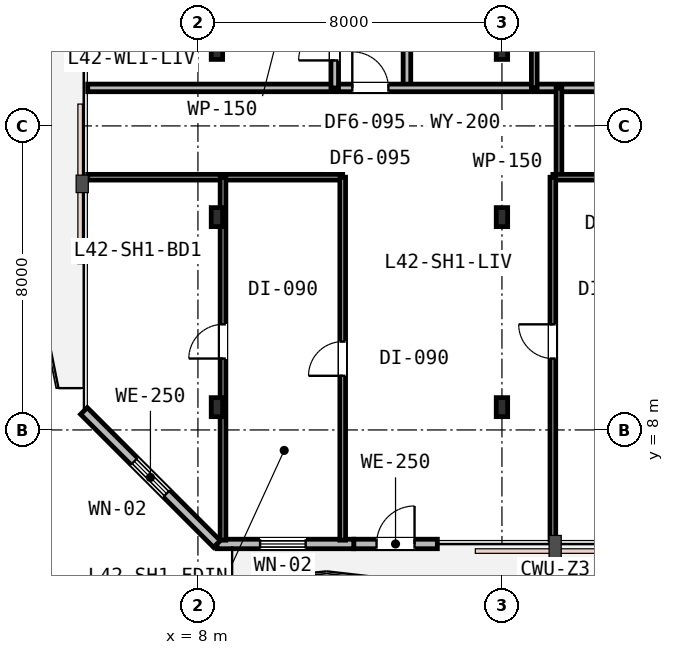
"""IFC4 building model, lengths in metres.
Left out: names, types, materials, properties, quantities, classifications, styles, units other than length and angle.
Written with IfcOpenShell. Run it as: python <this file> out.ifc"""

import sys

from ifc_helpers import new_model, si_unit, direction, frame, frame_2d, origin, origin_2d, place, context, subcontext, project, spatial, rectangle, i_section, extrude, element, fill, save


model = new_model("IFC4")
c1 = context("Model", 3, precision=1e-05, world=origin(), true_north=direction((0.0, 1.0)))
c2 = subcontext(c1, "Body", "Model", "MODEL_VIEW")
j1 = project(units=[si_unit("LENGTHUNIT", "METRE"), si_unit("PLANEANGLEUNIT", "RADIAN")], contexts=[c1])
p1 = place(None, origin())
s1 = spatial("IfcSite", under=j1, at=p1, CompositionType="ELEMENT")
p2 = place(p1, origin())
s2 = spatial("IfcBuilding", under=s1, at=p2, CompositionType="ELEMENT")
p3 = place(p2, frame((0.0, 0.0, 165.0)))
s3 = spatial("IfcBuildingStorey", under=s2, at=p3, CompositionType="ELEMENT", Elevation=165.0)
for number, where, z_axis, x_axis in (
    (1, (8.5, 8.6, 0.0), (0.0, 0.0, 1.0), (1.0, 0.0, 0.0)),
    (2, (16.0, 8.6, 0.0), (0.0, 0.0, 1.0), (1.0, 0.0, 0.0)),
    (3, (8.5, 13.6, 0.0), (0.0, 0.0, 1.0), (1.0, 0.0, 0.0)),
    (4, (16.0, 13.6, 0.0), (0.0, 0.0, 1.0), (1.0, 0.0, 0.0)),
    (5, (8.5, 18.0, 0.0), (0.0, 0.0, 1.0), (1.0, 0.0, 0.0)),
    (6, (16.0, 18.0, 0.0), (0.0, 0.0, 1.0), (1.0, 0.0, 0.0)),
):
    element("IfcColumn", number, at=place(p3, frame(where, z_axis=z_axis, x_axis=x_axis)), inside=s3, PredefinedType="COLUMN", context=c2, shape_type="SweptSolid", body=[
        extrude(i_section(OverallWidth=0.3, OverallDepth=0.5, WebThickness=0.015, FlangeThickness=0.028, FilletRadius=0.027, at=origin_2d()), origin(), (0.0, 0.0, 1.0), 3.6),
    ])
p4 = place(p3, frame((12.1, 5.0, 0.0), z_axis=(0.0, 0.0, 1.0), x_axis=(1.0, 0.0, 0.0)))
e7 = element("IfcWall", 7, at=p4, inside=s3, PredefinedType="STANDARD", context=c2, shape_type="SweptSolid", body=[
    extrude(rectangle(XDim=2.2, YDim=0.25, at=frame_2d((1.1, 0.0))), origin(), (0.0, 0.0, 1.0), 3.33),
])
p5 = place(p4, frame((0.6, 0.0, 0.0)))
e8 = element("IfcOpeningElement", 8, at=p5, cuts=e7, PredefinedType="OPENING", context=c2, shape_type="SweptSolid", body=[
    extrude(rectangle(XDim=1.0, YDim=2.15, at=frame_2d((0.5, 1.075))), frame((0.0, 0.135, 0.0), z_axis=(0.0, -1.0, 0.0), x_axis=(1.0, 0.0, 0.0)), (0.0, 0.0, 1.0), 0.27),
])
p6 = place(p3, frame((8.5, 5.0, 0.0), z_axis=(0.0, 0.0, 1.0), x_axis=(1.0, 0.0, 0.0)))
e9 = element("IfcWall", 9, at=p6, inside=s3, PredefinedType="STANDARD", context=c2, shape_type="SweptSolid", body=[
    extrude(rectangle(XDim=3.6, YDim=0.25, at=frame_2d((1.8, 0.0))), origin(), (0.0, 0.0, 1.0), 3.33),
])
p7 = place(p6, frame((1.135, 0.0, 0.85)))
e10 = element("IfcOpeningElement", 10, at=p7, cuts=e9, PredefinedType="OPENING", context=c2, shape_type="SweptSolid", body=[
    extrude(rectangle(XDim=1.2, YDim=1.6, at=frame_2d((0.6, 0.8))), frame((0.0, 0.135, 0.0), z_axis=(0.0, -1.0, 0.0), x_axis=(1.0, 0.0, 0.0)), (0.0, 0.0, 1.0), 0.27),
])
p8 = place(p3, frame((5.0, 8.5, 0.0), z_axis=(0.0, 0.0, 1.0), x_axis=(0.707106781187, -0.707106781187, 0.0)))
e11 = element("IfcWall", 11, at=p8, inside=s3, PredefinedType="STANDARD", context=c2, shape_type="SweptSolid", body=[
    extrude(rectangle(XDim=4.95, YDim=0.25, at=frame_2d((2.475, 0.0))), origin(), (0.0, 0.0, 1.0), 3.33),
])
p9 = place(p8, frame((1.875, 0.0, 0.85)))
e12 = element("IfcOpeningElement", 12, at=p9, cuts=e11, PredefinedType="OPENING", context=c2, shape_type="SweptSolid", body=[
    extrude(rectangle(XDim=1.2, YDim=1.6, at=frame_2d((0.6, 0.8))), frame((0.0, 0.135, 0.0), z_axis=(0.0, -1.0, 0.0), x_axis=(1.0, 0.0, 0.0)), (0.0, 0.0, 1.0), 0.27),
])
p10 = place(p3, frame((13.5, 17.0, 0.0), z_axis=(0.0, 0.0, 1.0), x_axis=(0.0, 1.0, 0.0)))
e13 = element("IfcWall", 13, at=p10, inside=s3, PredefinedType="PARTITIONING", context=c2, shape_type="SweptSolid", body=[
    extrude(rectangle(XDim=18.0, YDim=0.2, at=frame_2d((9.0, 0.0))), origin(), (0.0, 0.0, 1.0), 2.93),
])
p11 = place(p10, frame((15.425, 0.0, 0.0)))
e14 = element("IfcOpeningElement", 14, at=p11, cuts=e13, PredefinedType="OPENING", context=c2, shape_type="SweptSolid", body=[
    extrude(rectangle(XDim=0.95, YDim=2.15, at=frame_2d((0.475, 1.075))), frame((0.0, 0.11, 0.0), z_axis=(0.0, -1.0, 0.0), x_axis=(1.0, 0.0, 0.0)), (0.0, 0.0, 1.0), 0.22),
])
p12 = place(p10, frame((10.225, 0.0, 0.0)))
e15 = element("IfcOpeningElement", 15, at=p12, cuts=e13, PredefinedType="OPENING", context=c2, shape_type="SweptSolid", body=[
    extrude(rectangle(XDim=0.95, YDim=2.15, at=frame_2d((0.475, 1.075))), frame((0.0, 0.11, 0.0), z_axis=(0.0, -1.0, 0.0), x_axis=(1.0, 0.0, 0.0)), (0.0, 0.0, 1.0), 0.22),
])
p13 = place(p3, frame((5.1, 17.0, 0.0), z_axis=(0.0, 0.0, 1.0), x_axis=(1.0, 0.0, 0.0)))
e16 = element("IfcWall", 16, at=p13, inside=s3, PredefinedType="PARTITIONING", context=c2, shape_type="SweptSolid", body=[
    extrude(rectangle(XDim=18.8, YDim=0.2, at=frame_2d((9.4, 0.0))), origin(), (0.0, 0.0, 1.0), 2.93),
])
p14 = place(p13, frame((6.962, 0.0, 0.0)))
e17 = element("IfcOpeningElement", 17, at=p14, cuts=e16, PredefinedType="OPENING", context=c2, shape_type="SweptSolid", body=[
    extrude(rectangle(XDim=0.95, YDim=2.15, at=frame_2d((0.475, 1.075))), frame((0.0, 0.11, 0.0), z_axis=(0.0, -1.0, 0.0), x_axis=(1.0, 0.0, 0.0)), (0.0, 0.0, 1.0), 0.22),
])
p15 = place(p3, frame((11.6, 17.0, 0.0), z_axis=(0.0, 0.0, 1.0), x_axis=(0.0, 1.0, 0.0)))
e18 = element("IfcWall", 18, at=p15, inside=s3, PredefinedType="PARTITIONING", context=c2, shape_type="SweptSolid", body=[
    extrude(rectangle(XDim=11.6, YDim=0.2, at=frame_2d((5.8, 0.0))), origin(), (0.0, 0.0, 1.0), 2.93),
])
p16 = place(p15, frame((0.723, 0.0, 0.0)))
e19 = element("IfcOpeningElement", 19, at=p16, cuts=e18, PredefinedType="OPENING", context=c2, shape_type="SweptSolid", body=[
    extrude(rectangle(XDim=0.95, YDim=2.15, at=frame_2d((0.475, 1.075))), frame((0.0, 0.11, 0.0), z_axis=(0.0, -1.0, 0.0), x_axis=(1.0, 0.0, 0.0)), (0.0, 0.0, 1.0), 0.22),
])
p17 = place(p3, frame((16.85, 17.0, 0.0), z_axis=(0.0, 0.0, 1.0), x_axis=(0.0, 1.0, 0.0)))
e20 = element("IfcWall", 20, at=p17, inside=s3, PredefinedType="PARTITIONING", context=c2, shape_type="SweptSolid", body=[
    extrude(rectangle(XDim=9.8, YDim=0.15, at=frame_2d((4.9, 0.0))), origin(), (0.0, 0.0, 1.0), 2.93),
])
p18 = place(p17, frame((5.598, 0.0, 0.0)))
e21 = element("IfcOpeningElement", 21, at=p18, cuts=e20, PredefinedType="OPENING", context=c2, shape_type="SweptSolid", body=[
    extrude(rectangle(XDim=0.85, YDim=2.15, at=frame_2d((0.425, 1.075))), frame((0.0, 0.085, 0.0), z_axis=(0.0, -1.0, 0.0), x_axis=(1.0, 0.0, 0.0)), (0.0, 0.0, 1.0), 0.17),
])
p19 = place(p17, frame((8.496, 0.0, 0.0)))
e22 = element("IfcOpeningElement", 22, at=p19, cuts=e20, PredefinedType="OPENING", context=c2, shape_type="SweptSolid", body=[
    extrude(rectangle(XDim=0.85, YDim=2.15, at=frame_2d((0.425, 1.075))), frame((0.0, 0.085, 0.0), z_axis=(0.0, -1.0, 0.0), x_axis=(1.0, 0.0, 0.0)), (0.0, 0.0, 1.0), 0.17),
])
p20 = place(p17, frame((2.268, 0.0, 0.0)))
e23 = element("IfcOpeningElement", 23, at=p20, cuts=e20, PredefinedType="OPENING", context=c2, shape_type="SweptSolid", body=[
    extrude(rectangle(XDim=0.85, YDim=2.15, at=frame_2d((0.425, 1.075))), frame((0.0, 0.085, 0.0), z_axis=(0.0, -1.0, 0.0), x_axis=(1.0, 0.0, 0.0)), (0.0, 0.0, 1.0), 0.17),
])
p21 = place(p3, frame((17.5, 14.65, 0.0), z_axis=(0.0, 0.0, 1.0), x_axis=(0.0, 1.0, 0.0)))
e24 = element("IfcWall", 24, at=p21, inside=s3, PredefinedType="PARTITIONING", context=c2, shape_type="SweptSolid", body=[
    extrude(rectangle(XDim=2.35, YDim=0.15, at=frame_2d((1.175, 0.0))), origin(), (0.0, 0.0, 1.0), 3.33),
])
p22 = place(p3, frame((17.34, 14.65, 0.0), z_axis=(0.0, 0.0, 1.0), x_axis=(1.0, 0.0, 0.0)))
e25 = element("IfcWall", 25, at=p22, inside=s3, PredefinedType="PARTITIONING", context=c2, shape_type="SweptSolid", body=[
    extrude(rectangle(XDim=6.56, YDim=0.15, at=frame_2d((3.28, 0.0))), origin(), (0.0, 0.0, 1.0), 2.96),
])
p23 = place(p22, frame((1.335, 0.0, 0.0)))
e26 = element("IfcOpeningElement", 26, at=p23, cuts=e25, PredefinedType="OPENING", context=c2, shape_type="SweptSolid", body=[
    extrude(rectangle(XDim=0.85, YDim=2.15, at=frame_2d((0.425, 1.075))), frame((0.0, 0.085, 0.0), z_axis=(0.0, -1.0, 0.0), x_axis=(1.0, 0.0, 0.0)), (0.0, 0.0, 1.0), 0.17),
])
p24 = place(p22, frame((3.93, 0.0, 0.0)))
e27 = element("IfcOpeningElement", 27, at=p24, cuts=e25, PredefinedType="OPENING", context=c2, shape_type="SweptSolid", body=[
    extrude(rectangle(XDim=0.85, YDim=2.15, at=frame_2d((0.425, 1.075))), frame((0.0, 0.085, 0.0), z_axis=(0.0, -1.0, 0.0), x_axis=(1.0, 0.0, 0.0)), (0.0, 0.0, 1.0), 0.17),
])
p25 = place(p3, frame((5.1, 14.65, 0.0), z_axis=(0.0, 0.0, 1.0), x_axis=(1.0, 0.0, 0.0)))
e28 = element("IfcWall", 28, at=p25, inside=s3, PredefinedType="PARTITIONING", context=c2, shape_type="SweptSolid", body=[
    extrude(rectangle(XDim=6.71, YDim=0.15, at=frame_2d((3.355, 0.0))), origin(), (0.0, 0.0, 1.0), 2.93),
])
p26 = place(p3, frame((8.66, 5.1, 0.0), z_axis=(0.0, 0.0, 1.0), x_axis=(0.0, 1.0, 0.0)))
e29 = element("IfcWall", 29, at=p26, inside=s3, PredefinedType="PARTITIONING", context=c2, shape_type="SweptSolid", body=[
    extrude(rectangle(XDim=9.55, YDim=0.15, at=frame_2d((4.775, 0.0))), origin(), (0.0, 0.0, 1.0), 2.93),
])
p27 = place(p26, frame((4.779, 0.0, 0.0)))
e30 = element("IfcOpeningElement", 30, at=p27, cuts=e29, PredefinedType="OPENING", context=c2, shape_type="SweptSolid", body=[
    extrude(rectangle(XDim=0.9, YDim=2.15, at=frame_2d((0.45, 1.075))), frame((0.0, 0.085, 0.0), z_axis=(0.0, -1.0, 0.0), x_axis=(1.0, 0.0, 0.0)), (0.0, 0.0, 1.0), 0.17),
])
p28 = place(p3, frame((17.34, 5.1, 0.0), z_axis=(0.0, 0.0, 1.0), x_axis=(0.0, 1.0, 0.0)))
e31 = element("IfcWall", 31, at=p28, inside=s3, PredefinedType="PARTITIONING", context=c2, shape_type="SweptSolid", body=[
    extrude(rectangle(XDim=9.55, YDim=0.15, at=frame_2d((4.775, 0.0))), origin(), (0.0, 0.0, 1.0), 2.93),
])
p29 = place(p28, frame((4.779, 0.0, 0.0)))
e32 = element("IfcOpeningElement", 32, at=p29, cuts=e31, PredefinedType="OPENING", context=c2, shape_type="SweptSolid", body=[
    extrude(rectangle(XDim=0.9, YDim=2.15, at=frame_2d((0.45, 1.075))), frame((0.0, 0.085, 0.0), z_axis=(0.0, -1.0, 0.0), x_axis=(1.0, 0.0, 0.0)), (0.0, 0.0, 1.0), 0.17),
])
p30 = place(p3, frame((11.81, 5.1, 0.0), z_axis=(0.0, 0.0, 1.0), x_axis=(0.0, 1.0, 0.0)))
e33 = element("IfcWall", 33, at=p30, inside=s3, PredefinedType="PARTITIONING", context=c2, shape_type="SweptSolid", body=[
    extrude(rectangle(XDim=9.55, YDim=0.15, at=frame_2d((4.775, 0.0))), origin(), (0.0, 0.0, 1.0), 2.93),
])
p31 = place(p30, frame((4.325, 0.0, 0.0)))
e34 = element("IfcOpeningElement", 34, at=p31, cuts=e33, PredefinedType="OPENING", context=c2, shape_type="SweptSolid", body=[
    extrude(rectangle(XDim=0.9, YDim=2.15, at=frame_2d((0.45, 1.075))), frame((0.0, 0.085, 0.0), z_axis=(0.0, -1.0, 0.0), x_axis=(1.0, 0.0, 0.0)), (0.0, 0.0, 1.0), 0.17),
])
p32 = place(p5, origin())
e35 = element("IfcDoor", 35, at=p32, inside=s3, OperationType="SINGLE_SWING_RIGHT", PredefinedType="DOOR", context=c2, shape_type="SweptSolid", body=[
    extrude(rectangle(XDim=1.0, YDim=2.15, at=frame_2d((0.5, 1.075))), frame((0.0, 0.025, 0.0), z_axis=(0.0, -1.0, 0.0), x_axis=(1.0, 0.0, 0.0)), (0.0, 0.0, 1.0), 0.05),
])
fill(e8, e35)
p33 = place(p7, origin())
e36 = element("IfcWindow", 36, at=p33, inside=s3, PartitioningType="SINGLE_PANEL", PredefinedType="WINDOW", context=c2, shape_type="SweptSolid", body=[
    extrude(rectangle(XDim=1.2, YDim=1.6, at=frame_2d((0.6, 0.8))), frame((0.0, 0.03, 0.0), z_axis=(0.0, -1.0, 0.0), x_axis=(1.0, 0.0, 0.0)), (0.0, 0.0, 1.0), 0.06),
])
fill(e10, e36)
p34 = place(p9, origin())
e37 = element("IfcWindow", 37, at=p34, inside=s3, PartitioningType="SINGLE_PANEL", PredefinedType="WINDOW", context=c2, shape_type="SweptSolid", body=[
    extrude(rectangle(XDim=1.2, YDim=1.6, at=frame_2d((0.6, 0.8))), frame((0.0, 0.03, 0.0), z_axis=(0.0, -1.0, 0.0), x_axis=(1.0, 0.0, 0.0)), (0.0, 0.0, 1.0), 0.06),
])
fill(e12, e37)
p35 = place(p16, origin())
e38 = element("IfcDoor", 38, at=p35, inside=s3, OperationType="SINGLE_SWING_LEFT", PredefinedType="DOOR", context=c2, shape_type="SweptSolid", body=[
    extrude(rectangle(XDim=0.95, YDim=2.15, at=frame_2d((0.475, 1.075))), frame((0.0, 0.025, 0.0), z_axis=(0.0, -1.0, 0.0), x_axis=(1.0, 0.0, 0.0)), (0.0, 0.0, 1.0), 0.05),
])
fill(e19, e38)
p36 = place(p14, origin())
e39 = element("IfcDoor", 39, at=p36, inside=s3, OperationType="SINGLE_SWING_LEFT", PredefinedType="DOOR", context=c2, shape_type="SweptSolid", body=[
    extrude(rectangle(XDim=0.95, YDim=2.15, at=frame_2d((0.475, 1.075))), frame((0.0, 0.025, 0.0), z_axis=(0.0, -1.0, 0.0), x_axis=(1.0, 0.0, 0.0)), (0.0, 0.0, 1.0), 0.05),
])
fill(e17, e39)
p37 = place(p27, origin())
e40 = element("IfcDoor", 40, at=p37, inside=s3, OperationType="SINGLE_SWING_LEFT", PredefinedType="DOOR", context=c2, shape_type="SweptSolid", body=[
    extrude(rectangle(XDim=0.9, YDim=2.15, at=frame_2d((0.45, 1.075))), frame((0.0, 0.025, 0.0), z_axis=(0.0, -1.0, 0.0), x_axis=(1.0, 0.0, 0.0)), (0.0, 0.0, 1.0), 0.05),
])
fill(e30, e40)
p38 = place(p29, origin())
e41 = element("IfcDoor", 41, at=p38, inside=s3, OperationType="SINGLE_SWING_RIGHT", PredefinedType="DOOR", context=c2, shape_type="SweptSolid", body=[
    extrude(rectangle(XDim=0.9, YDim=2.15, at=frame_2d((0.45, 1.075))), frame((0.0, 0.025, 0.0), z_axis=(0.0, -1.0, 0.0), x_axis=(1.0, 0.0, 0.0)), (0.0, 0.0, 1.0), 0.05),
])
fill(e32, e41)
p39 = place(p31, origin())
e42 = element("IfcDoor", 42, at=p39, inside=s3, OperationType="SINGLE_SWING_LEFT", PredefinedType="DOOR", context=c2, shape_type="SweptSolid", body=[
    extrude(rectangle(XDim=0.9, YDim=2.15, at=frame_2d((0.45, 1.075))), frame((0.0, 0.025, 0.0), z_axis=(0.0, -1.0, 0.0), x_axis=(1.0, 0.0, 0.0)), (0.0, 0.0, 1.0), 0.05),
])
fill(e34, e42)
save(model, sys.argv[1])
